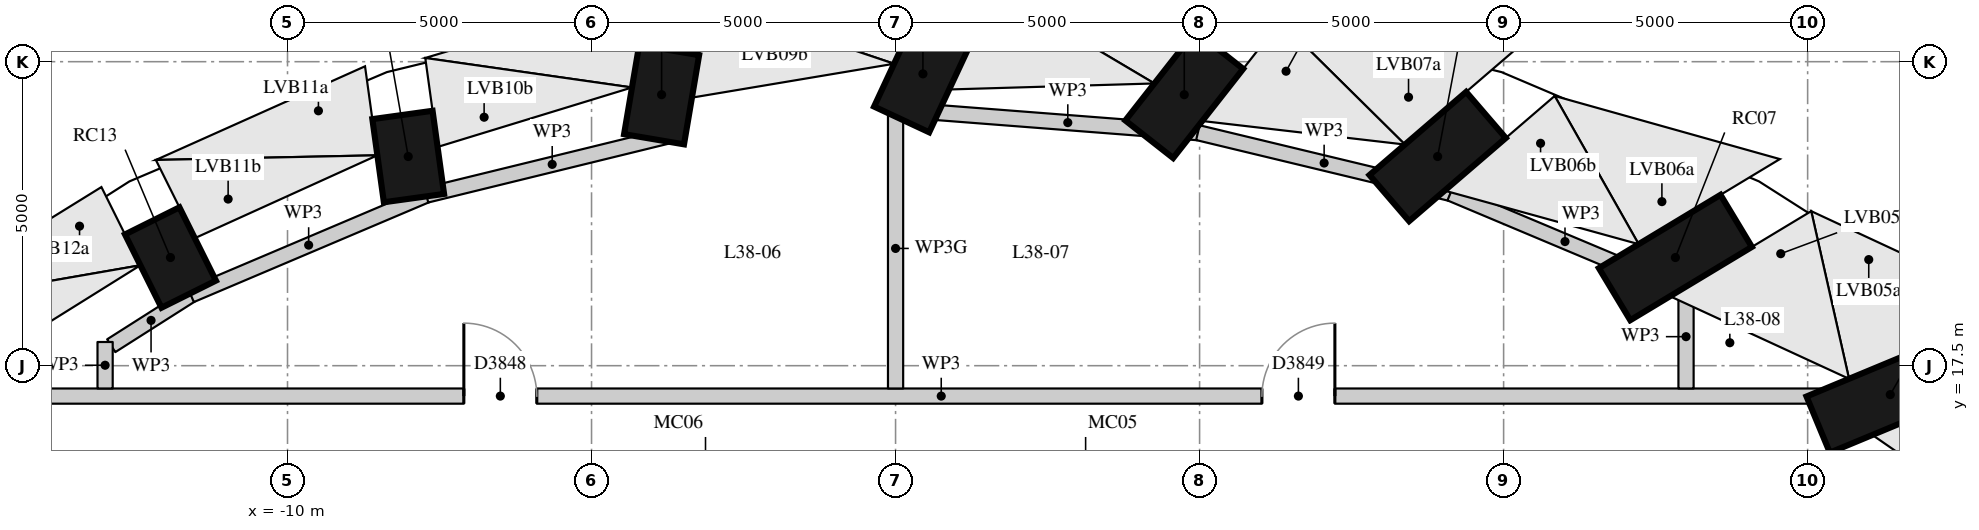
"""IFC4 building model, lengths in metres.
Left out: names, types, materials, properties, quantities, classifications, styles, units other than length and angle.
Written with IfcOpenShell. Run it as: python <this file> out.ifc"""

import sys

from ifc_helpers import new_model, si_unit, direction, frame, frame_2d, origin, origin_2d, place, context, subcontext, project, spatial, rectangle, extrude, element, fill, save


model = new_model("IFC4")
c1 = context("Model", 3, precision=1e-05, world=origin(), true_north=direction((0.0, 1.0)))
c2 = subcontext(c1, "Body", "Model", "MODEL_VIEW")
j1 = project(units=[si_unit("LENGTHUNIT", "METRE"), si_unit("PLANEANGLEUNIT", "RADIAN")], contexts=[c1])
p1 = place(None, origin())
s1 = spatial("IfcSite", under=j1, at=p1, CompositionType="ELEMENT")
p2 = place(p1, origin())
s2 = spatial("IfcBuilding", under=s1, at=p2, CompositionType="ELEMENT")
p3 = place(p2, frame((0.0, 0.0, 135.1)))
s3 = spatial("IfcBuildingStorey", under=s2, at=p3, CompositionType="ELEMENT", Elevation=135.1)
p4 = place(p3, frame((17.545, 17.517, 0.433), z_axis=(-0.532872454376, -0.221367276167, 0.816727296232), x_axis=(0.754234818577, 0.313326211568, 0.577023850105)))
e1 = element("IfcColumn", 1, at=p4, inside=s3, PredefinedType="COLUMN", context=c2, shape_type="SweptSolid", body=[
    extrude(rectangle(XDim=1.5, YDim=1.0, at=origin_2d()), origin(), (0.0, 0.0, 1.0), 4.45),
])
p5 = place(p3, frame((13.825, 19.882, 0.4), z_axis=(-0.457164324524, -0.275515169699, 0.845631226746), x_axis=(0.724271094402, 0.436490038216, 0.533767578962)))
e2 = element("IfcColumn", 2, at=p5, inside=s3, PredefinedType="COLUMN", context=c2, shape_type="SweptSolid", body=[
    extrude(rectangle(XDim=1.5, YDim=1.0, at=origin_2d()), origin(), (0.0, 0.0, 1.0), 4.375),
])
p6 = place(p3, frame((9.71, 21.624, 0.364), z_axis=(-0.368343075411, -0.316910839535, 0.874008523175), x_axis=(0.66253955774, 0.570028273871, 0.485910589942)))
e3 = element("IfcColumn", 3, at=p6, inside=s3, PredefinedType="COLUMN", context=c2, shape_type="SweptSolid", body=[
    extrude(rectangle(XDim=1.5, YDim=1.0, at=origin_2d()), origin(), (0.0, 0.0, 1.0), 4.315),
])
p7 = place(p3, frame((5.323, 22.691, 0.327), z_axis=(-0.269411518234, -0.343162635715, 0.899809334966), x_axis=(0.555645773671, 0.707753215107, 0.436283349107)))
e4 = element("IfcColumn", 4, at=p7, inside=s3, PredefinedType="COLUMN", context=c2, shape_type="SweptSolid", body=[
    extrude(rectangle(XDim=1.5, YDim=1.0, at=origin_2d()), origin(), (0.0, 0.0, 1.0), 4.274),
])
p8 = place(p3, frame((0.8, 23.05, 0.292), z_axis=(-0.164636934212, -0.352818041088, 0.921093974454), x_axis=(0.389494941986, 0.834690241912, 0.389340326994)))
e5 = element("IfcColumn", 5, at=p8, inside=s3, PredefinedType="COLUMN", context=c2, shape_type="SweptSolid", body=[
    extrude(rectangle(XDim=1.5, YDim=1.0, at=origin_2d()), origin(), (0.0, 0.0, 1.0), 4.251),
])
p9 = place(p3, frame((-3.724, 22.691, 0.263), z_axis=(-0.058567080264, -0.345591798771, 0.936555500615), x_axis=(0.156485870874, 0.923389613299, 0.35051932082)))
e6 = element("IfcColumn", 6, at=p9, inside=s3, PredefinedType="COLUMN", context=c2, shape_type="SweptSolid", body=[
    extrude(rectangle(XDim=1.5, YDim=1.0, at=origin_2d()), origin(), (0.0, 0.0, 1.0), 4.244),
])
p10 = place(p3, frame((-8.11, 21.624, 0.244), z_axis=(0.04459510793, -0.322293160668, 0.945588914347), x_axis=(-0.129604581556, 0.936664853283, 0.325363804171)))
e7 = element("IfcColumn", 7, at=p10, inside=s3, PredefinedType="COLUMN", context=c2, shape_type="SweptSolid", body=[
    extrude(rectangle(XDim=1.5, YDim=1.0, at=origin_2d()), origin(), (0.0, 0.0, 1.0), 4.243),
])
p11 = place(p3, frame((-12.225, 19.882, 0.238), z_axis=(0.141417418826, -0.284043041801, 0.948325188982), x_axis=(-0.422658902725, 0.848928805027, 0.317300072397)))
e8 = element("IfcColumn", 8, at=p11, inside=s3, PredefinedType="COLUMN", context=c2, shape_type="SweptSolid", body=[
    extrude(rectangle(XDim=1.5, YDim=1.0, at=origin_2d()), origin(), (0.0, 0.0, 1.0), 4.243),
])
p12 = place(p3, frame((19.579, 13.729, 0.0), z_axis=(0.0, 0.0, 1.0), x_axis=(-0.742177331878, 0.670203557172, 0.0)))
e9 = element("IfcWall", 9, at=p12, inside=s3, PredefinedType="PARTITIONING", context=c2, shape_type="SweptSolid", body=[
    extrude(rectangle(XDim=4.091, YDim=0.25, at=frame_2d((2.045, 0.0))), origin(), (0.0, 0.0, 1.0), 4.09),
])
p13 = place(p3, frame((-11.589, 18.662, 0.0), z_axis=(0.0, 0.0, 1.0), x_axis=(-0.843810409239, -0.536641400993, 0.0)))
e10 = element("IfcWall", 10, at=p13, inside=s3, PredefinedType="PARTITIONING", context=c2, shape_type="SweptSolid", body=[
    extrude(rectangle(XDim=1.552, YDim=0.25, at=frame_2d((0.776, 0.0))), origin(), (0.0, 0.0, 1.0), 4.09),
])
p14 = place(p3, frame((-7.715, 20.305, 0.0), z_axis=(0.0, 0.0, 1.0), x_axis=(-0.920600111253, -0.390506639075, 0.0)))
e11 = element("IfcWall", 11, at=p14, inside=s3, PredefinedType="PARTITIONING", context=c2, shape_type="SweptSolid", body=[
    extrude(rectangle(XDim=4.208, YDim=0.25, at=frame_2d((2.104, 0.0))), origin(), (0.0, 0.0, 1.0), 4.09),
])
p15 = place(p3, frame((-3.579, 21.317, 0.0), z_axis=(0.0, 0.0, 1.0), x_axis=(-0.971344325352, -0.237676674511, 0.0)))
e12 = element("IfcWall", 12, at=p15, inside=s3, PredefinedType="PARTITIONING", context=c2, shape_type="SweptSolid", body=[
    extrude(rectangle(XDim=4.259, YDim=0.25, at=frame_2d((2.129, 0.0))), origin(), (0.0, 0.0, 1.0), 4.09),
])
p16 = place(p3, frame((4.972, 21.333, 0.0), z_axis=(0.0, 0.0, 1.0), x_axis=(-0.997024965617, 0.077079296423, 0.0)))
e13 = element("IfcWall", 13, at=p16, inside=s3, PredefinedType="PARTITIONING", context=c2, shape_type="SweptSolid", body=[
    extrude(rectangle(XDim=4.292, YDim=0.25, at=frame_2d((2.146, 0.0))), origin(), (0.0, 0.0, 1.0), 4.09),
])
p17 = place(p3, frame((9.125, 20.334, 0.0), z_axis=(0.0, 0.0, 1.0), x_axis=(-0.972269387962, 0.233863715084, 0.0)))
e14 = element("IfcWall", 14, at=p17, inside=s3, PredefinedType="PARTITIONING", context=c2, shape_type="SweptSolid", body=[
    extrude(rectangle(XDim=4.271, YDim=0.25, at=frame_2d((2.135, 0.0))), origin(), (0.0, 0.0, 1.0), 4.09),
])
p18 = place(p3, frame((12.895, 18.749, 0.0), z_axis=(0.0, 0.0, 1.0), x_axis=(-0.921867823911, 0.387504471248, 0.0)))
e15 = element("IfcWall", 15, at=p18, inside=s3, PredefinedType="PARTITIONING", context=c2, shape_type="SweptSolid", body=[
    extrude(rectangle(XDim=4.09, YDim=0.25, at=frame_2d((2.045, 0.0))), origin(), (0.0, 0.0, 1.0), 4.09),
])
p19 = place(p3, frame((-14.327, 17.0, 0.0), z_axis=(0.0, 0.0, 1.0), x_axis=(1.0, 0.0, 0.0)))
e16 = element("IfcWall", 16, at=p19, inside=s3, PredefinedType="PARTITIONING", context=c2, shape_type="SweptSolid", body=[
    extrude(rectangle(XDim=30.157, YDim=0.25, at=frame_2d((15.079, 0.0))), origin(), (0.0, 0.0, 1.0), 4.09),
])
p20 = place(p19, frame((7.228, 0.0, 0.0)))
e17 = element("IfcOpeningElement", 17, at=p20, cuts=e16, PredefinedType="OPENING", context=c2, shape_type="SweptSolid", body=[
    extrude(rectangle(XDim=1.2, YDim=2.1, at=frame_2d((0.6, 1.05))), frame((0.0, 0.135, 0.0), z_axis=(0.0, -1.0, 0.0), x_axis=(1.0, 0.0, 0.0)), (0.0, 0.0, 1.0), 0.27),
])
p21 = place(p19, frame((20.353, 0.0, 0.0)))
e18 = element("IfcOpeningElement", 18, at=p21, cuts=e16, PredefinedType="OPENING", context=c2, shape_type="SweptSolid", body=[
    extrude(rectangle(XDim=1.2, YDim=2.1, at=frame_2d((0.6, 1.05))), frame((0.0, 0.135, 0.0), z_axis=(0.0, -1.0, 0.0), x_axis=(1.0, 0.0, 0.0)), (0.0, 0.0, 1.0), 0.27),
])
p22 = place(p3, frame((-13.0, 17.125, 0.0), z_axis=(0.0, 0.0, 1.0), x_axis=(0.0, 1.0, 0.0)))
e19 = element("IfcWall", 19, at=p22, inside=s3, PredefinedType="PARTITIONING", context=c2, shape_type="SweptSolid", body=[
    extrude(rectangle(XDim=0.765, YDim=0.25, at=frame_2d((0.382, 0.0))), origin(), (0.0, 0.0, 1.0), 4.09),
])
p23 = place(p3, frame((0.0, 17.125, 0.0), z_axis=(0.0, 0.0, 1.0), x_axis=(0.0, 1.0, 0.0)))
e20 = element("IfcWall", 20, at=p23, inside=s3, PredefinedType="PARTITIONING", context=c2, shape_type="SweptSolid", body=[
    extrude(rectangle(XDim=4.607, YDim=0.25, at=frame_2d((2.304, 0.0))), origin(), (0.0, 0.0, 1.0), 3.64),
])
p24 = place(p3, frame((13.0, 17.125, 0.0), z_axis=(0.0, 0.0, 1.0), x_axis=(0.0, 1.0, 0.0)))
e21 = element("IfcWall", 21, at=p24, inside=s3, PredefinedType="PARTITIONING", context=c2, shape_type="SweptSolid", body=[
    extrude(rectangle(XDim=1.705, YDim=0.25, at=frame_2d((0.853, 0.0))), origin(), (0.0, 0.0, 1.0), 4.09),
])
p25 = place(p20, origin())
e22 = element("IfcDoor", 22, at=p25, inside=s3, OperationType="SINGLE_SWING_LEFT", PredefinedType="DOOR", context=c2, shape_type="SweptSolid", body=[
    extrude(rectangle(XDim=1.2, YDim=2.1, at=frame_2d((0.6, 1.05))), frame((0.0, 0.025, 0.0), z_axis=(0.0, -1.0, 0.0), x_axis=(1.0, 0.0, 0.0)), (0.0, 0.0, 1.0), 0.05),
])
fill(e17, e22)
p26 = place(p21, origin())
e23 = element("IfcDoor", 23, at=p26, inside=s3, OperationType="SINGLE_SWING_RIGHT", PredefinedType="DOOR", context=c2, shape_type="SweptSolid", body=[
    extrude(rectangle(XDim=1.2, YDim=2.1, at=frame_2d((0.6, 1.05))), frame((0.0, 0.025, 0.0), z_axis=(0.0, -1.0, 0.0), x_axis=(1.0, 0.0, 0.0)), (0.0, 0.0, 1.0), 0.05),
])
fill(e18, e23)
save(model, sys.argv[1])
